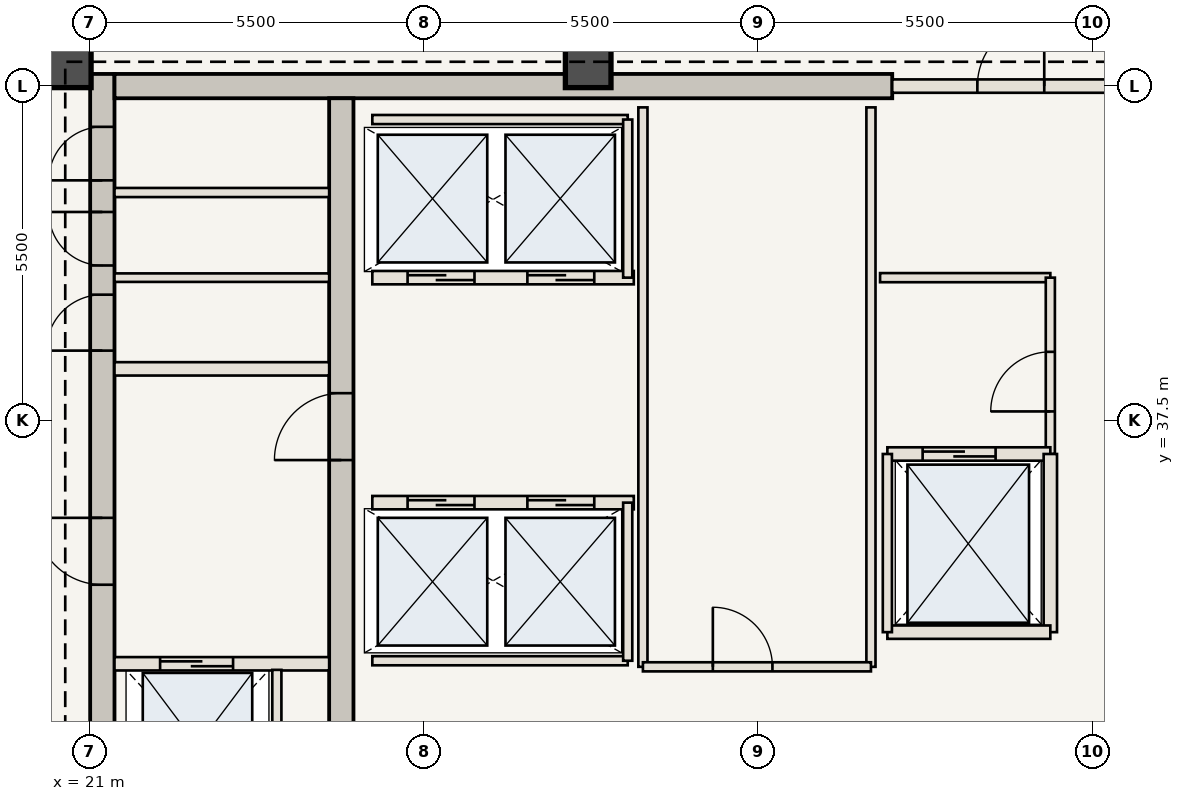
"""IFC4 building model, lengths in metres.
Left out: names, types, materials, properties, quantities, classifications, styles, units other than length and angle.
Written with IfcOpenShell. Run it as: python <this file> out.ifc"""

import sys

from ifc_helpers import new_model, si_unit, direction, frame, frame_2d, origin, origin_2d, place, context, subcontext, project, spatial, rectangle, extrude, element, fill, save


model = new_model("IFC4")
c1 = context("Model", 3, precision=1e-05, world=origin(), true_north=direction((0.0, 1.0)))
c2 = subcontext(c1, "Body", "Model", "MODEL_VIEW")
j1 = project(units=[si_unit("LENGTHUNIT", "METRE"), si_unit("PLANEANGLEUNIT", "RADIAN")], contexts=[c1])
p1 = place(None, origin())
s1 = spatial("IfcSite", under=j1, at=p1, CompositionType="ELEMENT")
p2 = place(p1, origin())
s2 = spatial("IfcBuilding", under=s1, at=p2, CompositionType="ELEMENT")
p3 = place(p2, frame((0.0, 0.0, 269.85)))
s3 = spatial("IfcBuildingStorey", under=s2, at=p3, CompositionType="ELEMENT", Elevation=269.85)
p4 = place(p3, frame((21.21, 30.6, 0.0), z_axis=(0.0, 0.0, 1.0), x_axis=(0.0, 1.0, 0.0)))
e1 = element("IfcWall", 1, at=p4, inside=s3, PredefinedType="SHEAR", context=c2, shape_type="SweptSolid", body=[
    extrude(rectangle(XDim=12.6, YDim=0.4, at=frame_2d((6.3, 0.0))), origin(), (0.0, 0.0, 1.0), 3.85),
])
p5 = place(p4, frame((4.2, 0.0, 0.0)))
e2 = element("IfcOpeningElement", 2, at=p5, cuts=e1, PredefinedType="OPENING", context=c2, shape_type="SweptSolid", body=[
    extrude(rectangle(XDim=1.1, YDim=2.15, at=frame_2d((0.55, 1.075))), frame((0.0, 0.21, 0.0), z_axis=(0.0, -1.0, 0.0), x_axis=(1.0, 0.0, 0.0)), (0.0, 0.0, 1.0), 0.42),
])
p6 = place(p4, frame((8.05, 0.0, 0.0)))
e3 = element("IfcOpeningElement", 3, at=p6, cuts=e1, PredefinedType="OPENING", context=c2, shape_type="SweptSolid", body=[
    extrude(rectangle(XDim=0.92, YDim=2.1, at=frame_2d((0.46, 1.05))), frame((0.0, 0.21, 0.0), z_axis=(0.0, -1.0, 0.0), x_axis=(1.0, 0.0, 0.0)), (0.0, 0.0, 1.0), 0.42),
])
p7 = place(p4, frame((9.45, 0.0, 0.0)))
e4 = element("IfcOpeningElement", 4, at=p7, cuts=e1, PredefinedType="OPENING", context=c2, shape_type="SweptSolid", body=[
    extrude(rectangle(XDim=0.88, YDim=2.1, at=frame_2d((0.44, 1.05))), frame((0.0, 0.21, 0.0), z_axis=(0.0, -1.0, 0.0), x_axis=(1.0, 0.0, 0.0)), (0.0, 0.0, 1.0), 0.42),
])
p8 = place(p4, frame((10.85, 0.0, 0.0)))
e5 = element("IfcOpeningElement", 5, at=p8, cuts=e1, PredefinedType="OPENING", context=c2, shape_type="SweptSolid", body=[
    extrude(rectangle(XDim=0.88, YDim=2.1, at=frame_2d((0.44, 1.05))), frame((0.0, 0.21, 0.0), z_axis=(0.0, -1.0, 0.0), x_axis=(1.0, 0.0, 0.0)), (0.0, 0.0, 1.0), 0.42),
])
p9 = place(p3, frame((21.41, 43.0, 0.0), z_axis=(0.0, 0.0, 1.0), x_axis=(1.0, 0.0, 0.0)))
e6 = element("IfcWall", 6, at=p9, inside=s3, PredefinedType="SHEAR", context=c2, shape_type="SweptSolid", body=[
    extrude(rectangle(XDim=12.79, YDim=0.4, at=frame_2d((6.395, 0.0))), origin(), (0.0, 0.0, 1.0), 3.85),
])
p10 = place(p3, frame((25.14, 30.6, 0.0), z_axis=(0.0, 0.0, 1.0), x_axis=(0.0, 1.0, 0.0)))
e7 = element("IfcWall", 7, at=p10, inside=s3, PredefinedType="SHEAR", context=c2, shape_type="SweptSolid", body=[
    extrude(rectangle(XDim=12.2, YDim=0.4, at=frame_2d((6.1, 0.0))), origin(), (0.0, 0.0, 1.0), 3.85),
])
p11 = place(p10, frame((6.25, 0.0, 0.0)))
e8 = element("IfcOpeningElement", 8, at=p11, cuts=e7, PredefinedType="OPENING", context=c2, shape_type="SweptSolid", body=[
    extrude(rectangle(XDim=1.1, YDim=2.15, at=frame_2d((0.55, 1.075))), frame((0.0, 0.21, 0.0), z_axis=(0.0, -1.0, 0.0), x_axis=(1.0, 0.0, 0.0)), (0.0, 0.0, 1.0), 0.42),
])
for number, where, z_axis, x_axis in (
    (9, (29.2, 43.35, 0.0), (0.0, 0.0, 1.0), (1.0, 0.0, 0.0)),
    (10, (20.65, 43.35, 0.0), (0.0, 0.0, 1.0), (1.0, 0.0, 0.0)),
):
    element("IfcColumn", number, at=place(p3, frame(where, z_axis=z_axis, x_axis=x_axis)), inside=s3, PredefinedType="COLUMN", context=c2, shape_type="SweptSolid", body=[
        extrude(rectangle(XDim=0.75, YDim=0.75, at=origin_2d()), origin(), (0.0, 0.0, 1.0), 3.85),
    ])
p12 = place(p3, frame((21.41, 33.5, 0.0), z_axis=(0.0, 0.0, 1.0), x_axis=(1.0, 0.0, 0.0)))
e11 = element("IfcWall", 11, at=p12, inside=s3, PredefinedType="STANDARD", context=c2, shape_type="SweptSolid", body=[
    extrude(rectangle(XDim=3.53, YDim=0.22, at=frame_2d((1.765, 0.0))), origin(), (0.0, 0.0, 1.0), 3.685),
])
p13 = place(p12, frame((0.75, 0.0, 0.0)))
e12 = element("IfcOpeningElement", 12, at=p13, cuts=e11, PredefinedType="OPENING", context=c2, shape_type="SweptSolid", body=[
    extrude(rectangle(XDim=1.2, YDim=2.2, at=frame_2d((0.6, 1.1))), frame((0.0, 0.12, 0.0), z_axis=(0.0, -1.0, 0.0), x_axis=(1.0, 0.0, 0.0)), (0.0, 0.0, 1.0), 0.24),
])
p14 = place(p3, frame((24.08, 30.75, 0.0), z_axis=(0.0, 0.0, 1.0), x_axis=(0.0, 1.0, 0.0)))
e13 = element("IfcWall", 13, at=p14, inside=s3, PredefinedType="STANDARD", context=c2, shape_type="SweptSolid", body=[
    extrude(rectangle(XDim=2.65, YDim=0.15, at=frame_2d((1.325, 0.0))), origin(), (0.0, 0.0, 1.0), 3.685),
])
p15 = place(p3, frame((21.41, 38.35, 0.0), z_axis=(0.0, 0.0, 1.0), x_axis=(1.0, 0.0, 0.0)))
e14 = element("IfcWall", 14, at=p15, inside=s3, PredefinedType="STANDARD", context=c2, shape_type="SweptSolid", body=[
    extrude(rectangle(XDim=3.53, YDim=0.22, at=frame_2d((1.765, 0.0))), origin(), (0.0, 0.0, 1.0), 3.685),
])
p16 = place(p3, frame((21.41, 39.85, 0.0), z_axis=(0.0, 0.0, 1.0), x_axis=(1.0, 0.0, 0.0)))
e15 = element("IfcWall", 15, at=p16, inside=s3, PredefinedType="STANDARD", context=c2, shape_type="SweptSolid", body=[
    extrude(rectangle(XDim=3.53, YDim=0.14, at=frame_2d((1.765, 0.0))), origin(), (0.0, 0.0, 1.0), 3.685),
])
p17 = place(p3, frame((21.41, 41.25, 0.0), z_axis=(0.0, 0.0, 1.0), x_axis=(1.0, 0.0, 0.0)))
e16 = element("IfcWall", 16, at=p17, inside=s3, PredefinedType="STANDARD", context=c2, shape_type="SweptSolid", body=[
    extrude(rectangle(XDim=3.53, YDim=0.15, at=frame_2d((1.765, 0.0))), origin(), (0.0, 0.0, 1.0), 3.685),
])
p18 = place(p3, frame((34.0, 39.85, 0.0), z_axis=(0.0, 0.0, 1.0), x_axis=(1.0, 0.0, 0.0)))
e17 = element("IfcWall", 17, at=p18, inside=s3, PredefinedType="STANDARD", context=c2, shape_type="SweptSolid", body=[
    extrude(rectangle(XDim=2.8, YDim=0.15, at=frame_2d((1.4, 0.0))), origin(), (0.0, 0.0, 1.0), 3.685),
])
p19 = place(p3, frame((36.8, 36.95, 0.0), z_axis=(0.0, 0.0, 1.0), x_axis=(0.0, 1.0, 0.0)))
e18 = element("IfcWall", 18, at=p19, inside=s3, PredefinedType="STANDARD", context=c2, shape_type="SweptSolid", body=[
    extrude(rectangle(XDim=2.9, YDim=0.15, at=frame_2d((1.45, 0.0))), origin(), (0.0, 0.0, 1.0), 3.685),
])
p20 = place(p19, frame((0.7, 0.0, 0.0)))
e19 = element("IfcOpeningElement", 19, at=p20, cuts=e18, PredefinedType="OPENING", context=c2, shape_type="SweptSolid", body=[
    extrude(rectangle(XDim=0.98, YDim=2.2, at=frame_2d((0.49, 1.1))), frame((0.0, 0.085, 0.0), z_axis=(0.0, -1.0, 0.0), x_axis=(1.0, 0.0, 0.0)), (0.0, 0.0, 1.0), 0.17),
])
p21 = place(p3, frame((25.65, 36.15, 0.0), z_axis=(0.0, 0.0, 1.0), x_axis=(1.0, 0.0, 0.0)))
e20 = element("IfcWall", 20, at=p21, inside=s3, PredefinedType="STANDARD", context=c2, shape_type="SweptSolid", body=[
    extrude(rectangle(XDim=4.3, YDim=0.22, at=frame_2d((2.15, 0.0))), origin(), (0.0, 0.0, 1.0), 3.685),
])
p22 = place(p21, frame((0.58, 0.0, 0.0)))
e21 = element("IfcOpeningElement", 21, at=p22, cuts=e20, PredefinedType="OPENING", context=c2, shape_type="SweptSolid", body=[
    extrude(rectangle(XDim=1.1, YDim=2.15, at=frame_2d((0.55, 1.075))), frame((0.0, 0.12, 0.0), z_axis=(0.0, -1.0, 0.0), x_axis=(1.0, 0.0, 0.0)), (0.0, 0.0, 1.0), 0.24),
])
p23 = place(p21, frame((2.55, 0.0, 0.0)))
e22 = element("IfcOpeningElement", 22, at=p23, cuts=e20, PredefinedType="OPENING", context=c2, shape_type="SweptSolid", body=[
    extrude(rectangle(XDim=1.1, YDim=2.15, at=frame_2d((0.55, 1.075))), frame((0.0, 0.12, 0.0), z_axis=(0.0, -1.0, 0.0), x_axis=(1.0, 0.0, 0.0)), (0.0, 0.0, 1.0), 0.24),
])
p24 = place(p3, frame((25.65, 33.55, 0.0), z_axis=(0.0, 0.0, 1.0), x_axis=(1.0, 0.0, 0.0)))
e23 = element("IfcWall", 23, at=p24, inside=s3, PredefinedType="STANDARD", context=c2, shape_type="SweptSolid", body=[
    extrude(rectangle(XDim=4.2, YDim=0.15, at=frame_2d((2.1, 0.0))), origin(), (0.0, 0.0, 1.0), 3.685),
])
p25 = place(p3, frame((29.85, 33.55, 0.0), z_axis=(0.0, 0.0, 1.0), x_axis=(0.0, 1.0, 0.0)))
e24 = element("IfcWall", 24, at=p25, inside=s3, PredefinedType="STANDARD", context=c2, shape_type="SweptSolid", body=[
    extrude(rectangle(XDim=2.6, YDim=0.15, at=frame_2d((1.3, 0.0))), origin(), (0.0, 0.0, 1.0), 3.685),
])
p26 = place(p3, frame((25.65, 39.85, 0.0), z_axis=(0.0, 0.0, 1.0), x_axis=(1.0, 0.0, 0.0)))
e25 = element("IfcWall", 25, at=p26, inside=s3, PredefinedType="STANDARD", context=c2, shape_type="SweptSolid", body=[
    extrude(rectangle(XDim=4.3, YDim=0.22, at=frame_2d((2.15, 0.0))), origin(), (0.0, 0.0, 1.0), 3.685),
])
p27 = place(p26, frame((0.58, 0.0, 0.0)))
e26 = element("IfcOpeningElement", 26, at=p27, cuts=e25, PredefinedType="OPENING", context=c2, shape_type="SweptSolid", body=[
    extrude(rectangle(XDim=1.1, YDim=2.15, at=frame_2d((0.55, 1.075))), frame((0.0, 0.12, 0.0), z_axis=(0.0, -1.0, 0.0), x_axis=(1.0, 0.0, 0.0)), (0.0, 0.0, 1.0), 0.24),
])
p28 = place(p26, frame((2.55, 0.0, 0.0)))
e27 = element("IfcOpeningElement", 27, at=p28, cuts=e25, PredefinedType="OPENING", context=c2, shape_type="SweptSolid", body=[
    extrude(rectangle(XDim=1.1, YDim=2.15, at=frame_2d((0.55, 1.075))), frame((0.0, 0.12, 0.0), z_axis=(0.0, -1.0, 0.0), x_axis=(1.0, 0.0, 0.0)), (0.0, 0.0, 1.0), 0.24),
])
p29 = place(p3, frame((25.65, 42.45, 0.0), z_axis=(0.0, 0.0, 1.0), x_axis=(1.0, 0.0, 0.0)))
e28 = element("IfcWall", 28, at=p29, inside=s3, PredefinedType="STANDARD", context=c2, shape_type="SweptSolid", body=[
    extrude(rectangle(XDim=4.2, YDim=0.15, at=frame_2d((2.1, 0.0))), origin(), (0.0, 0.0, 1.0), 3.685),
])
p30 = place(p3, frame((29.85, 39.85, 0.0), z_axis=(0.0, 0.0, 1.0), x_axis=(0.0, 1.0, 0.0)))
e29 = element("IfcWall", 29, at=p30, inside=s3, PredefinedType="STANDARD", context=c2, shape_type="SweptSolid", body=[
    extrude(rectangle(XDim=2.6, YDim=0.15, at=frame_2d((1.3, 0.0))), origin(), (0.0, 0.0, 1.0), 3.685),
])
for number, where, z_axis, x_axis in (
    (30, (30.1, 33.45, 0.0), (0.0, 0.0, 1.0), (0.0, 1.0, 0.0)),
    (31, (33.85, 33.45, 0.0), (0.0, 0.0, 1.0), (0.0, 1.0, 0.0)),
):
    element("IfcWall", number, at=place(p3, frame(where, z_axis=z_axis, x_axis=x_axis)), inside=s3, PredefinedType="STANDARD", context=c2, shape_type="SweptSolid", body=[
        extrude(rectangle(XDim=9.2, YDim=0.15, at=frame_2d((4.6, 0.0))), origin(), (0.0, 0.0, 1.0), 3.685),
    ])
p31 = place(p3, frame((30.1, 33.45, 0.0), z_axis=(0.0, 0.0, 1.0), x_axis=(1.0, 0.0, 0.0)))
e32 = element("IfcWall", 32, at=p31, inside=s3, PredefinedType="STANDARD", context=c2, shape_type="SweptSolid", body=[
    extrude(rectangle(XDim=3.75, YDim=0.15, at=frame_2d((1.875, 0.0))), origin(), (0.0, 0.0, 1.0), 3.685),
])
p32 = place(p31, frame((1.15, 0.0, 0.0)))
e33 = element("IfcOpeningElement", 33, at=p32, cuts=e32, PredefinedType="OPENING", context=c2, shape_type="SweptSolid", body=[
    extrude(rectangle(XDim=0.98, YDim=2.2, at=frame_2d((0.49, 1.1))), frame((0.0, 0.085, 0.0), z_axis=(0.0, -1.0, 0.0), x_axis=(1.0, 0.0, 0.0)), (0.0, 0.0, 1.0), 0.17),
])
p33 = place(p3, frame((34.2, 43.0, 0.0), z_axis=(0.0, 0.0, 1.0), x_axis=(1.0, 0.0, 0.0)))
e34 = element("IfcWall", 34, at=p33, inside=s3, PredefinedType="STANDARD", context=c2, shape_type="SweptSolid", body=[
    extrude(rectangle(XDim=3.55, YDim=0.22, at=frame_2d((1.775, 0.0))), origin(), (0.0, 0.0, 1.0), 3.685),
])
p34 = place(p33, frame((1.4, 0.0, 0.0)))
e35 = element("IfcOpeningElement", 35, at=p34, cuts=e34, PredefinedType="OPENING", context=c2, shape_type="SweptSolid", body=[
    extrude(rectangle(XDim=1.1, YDim=2.15, at=frame_2d((0.55, 1.075))), frame((0.0, 0.12, 0.0), z_axis=(0.0, -1.0, 0.0), x_axis=(1.0, 0.0, 0.0)), (0.0, 0.0, 1.0), 0.24),
])
p35 = place(p3, frame((34.12, 36.95, 0.0), z_axis=(0.0, 0.0, 1.0), x_axis=(1.0, 0.0, 0.0)))
e36 = element("IfcWall", 36, at=p35, inside=s3, PredefinedType="STANDARD", context=c2, shape_type="SweptSolid", body=[
    extrude(rectangle(XDim=2.68, YDim=0.22, at=frame_2d((1.34, 0.0))), origin(), (0.0, 0.0, 1.0), 3.685),
])
p36 = place(p35, frame((0.58, 0.0, 0.0)))
e37 = element("IfcOpeningElement", 37, at=p36, cuts=e36, PredefinedType="OPENING", context=c2, shape_type="SweptSolid", body=[
    extrude(rectangle(XDim=1.2, YDim=2.2, at=frame_2d((0.6, 1.1))), frame((0.0, 0.12, 0.0), z_axis=(0.0, -1.0, 0.0), x_axis=(1.0, 0.0, 0.0)), (0.0, 0.0, 1.0), 0.24),
])
p37 = place(p3, frame((36.8, 34.02, 0.0), z_axis=(0.0, 0.0, 1.0), x_axis=(0.0, 1.0, 0.0)))
e38 = element("IfcWall", 38, at=p37, inside=s3, PredefinedType="STANDARD", context=c2, shape_type="SweptSolid", body=[
    extrude(rectangle(XDim=2.93, YDim=0.22, at=frame_2d((1.465, 0.0))), origin(), (0.0, 0.0, 1.0), 3.685),
])
p38 = place(p3, frame((34.12, 34.02, 0.0), z_axis=(0.0, 0.0, 1.0), x_axis=(1.0, 0.0, 0.0)))
e39 = element("IfcWall", 39, at=p38, inside=s3, PredefinedType="STANDARD", context=c2, shape_type="SweptSolid", body=[
    extrude(rectangle(XDim=2.68, YDim=0.22, at=frame_2d((1.34, 0.0))), origin(), (0.0, 0.0, 1.0), 3.685),
])
p39 = place(p3, frame((34.12, 34.02, 0.0), z_axis=(0.0, 0.0, 1.0), x_axis=(0.0, 1.0, 0.0)))
e40 = element("IfcWall", 40, at=p39, inside=s3, PredefinedType="STANDARD", context=c2, shape_type="SweptSolid", body=[
    extrude(rectangle(XDim=2.93, YDim=0.15, at=frame_2d((1.465, 0.0))), origin(), (0.0, 0.0, 1.0), 3.685),
])
p40 = place(p5, origin())
e41 = element("IfcDoor", 41, at=p40, inside=s3, OperationType="SINGLE_SWING_RIGHT", PredefinedType="DOOR", context=c2, shape_type="SweptSolid", body=[
    extrude(rectangle(XDim=1.1, YDim=2.15, at=frame_2d((0.55, 1.075))), frame((0.0, 0.025, 0.0), z_axis=(0.0, -1.0, 0.0), x_axis=(1.0, 0.0, 0.0)), (0.0, 0.0, 1.0), 0.05),
])
fill(e2, e41)
p41 = place(p11, origin())
e42 = element("IfcDoor", 42, at=p41, inside=s3, OperationType="SINGLE_SWING_LEFT", PredefinedType="DOOR", context=c2, shape_type="SweptSolid", body=[
    extrude(rectangle(XDim=1.1, YDim=2.15, at=frame_2d((0.55, 1.075))), frame((0.0, 0.025, 0.0), z_axis=(0.0, -1.0, 0.0), x_axis=(1.0, 0.0, 0.0)), (0.0, 0.0, 1.0), 0.05),
])
fill(e8, e42)
p42 = place(p6, origin())
e43 = element("IfcDoor", 43, at=p42, inside=s3, OperationType="SINGLE_SWING_LEFT", PredefinedType="DOOR", context=c2, shape_type="SweptSolid", body=[
    extrude(rectangle(XDim=0.92, YDim=2.1, at=frame_2d((0.46, 1.05))), frame((0.0, 0.025, 0.0), z_axis=(0.0, -1.0, 0.0), x_axis=(1.0, 0.0, 0.0)), (0.0, 0.0, 1.0), 0.05),
])
fill(e3, e43)
p43 = place(p7, origin())
e44 = element("IfcDoor", 44, at=p43, inside=s3, OperationType="SINGLE_SWING_RIGHT", PredefinedType="DOOR", context=c2, shape_type="SweptSolid", body=[
    extrude(rectangle(XDim=0.88, YDim=2.1, at=frame_2d((0.44, 1.05))), frame((0.0, 0.025, 0.0), z_axis=(0.0, -1.0, 0.0), x_axis=(1.0, 0.0, 0.0)), (0.0, 0.0, 1.0), 0.05),
])
fill(e4, e44)
p44 = place(p8, origin())
e45 = element("IfcDoor", 45, at=p44, inside=s3, OperationType="SINGLE_SWING_LEFT", PredefinedType="DOOR", context=c2, shape_type="SweptSolid", body=[
    extrude(rectangle(XDim=0.88, YDim=2.1, at=frame_2d((0.44, 1.05))), frame((0.0, 0.025, 0.0), z_axis=(0.0, -1.0, 0.0), x_axis=(1.0, 0.0, 0.0)), (0.0, 0.0, 1.0), 0.05),
])
fill(e5, e45)
p45 = place(p13, origin())
e46 = element("IfcDoor", 46, at=p45, inside=s3, OperationType="DOUBLE_DOOR_SLIDING", PredefinedType="DOOR", context=c2, shape_type="SweptSolid", body=[
    extrude(rectangle(XDim=1.2, YDim=2.2, at=frame_2d((0.6, 1.1))), frame((0.0, 0.025, 0.0), z_axis=(0.0, -1.0, 0.0), x_axis=(1.0, 0.0, 0.0)), (0.0, 0.0, 1.0), 0.05),
])
fill(e12, e46)
p46 = place(p20, origin())
e47 = element("IfcDoor", 47, at=p46, inside=s3, OperationType="SINGLE_SWING_LEFT", PredefinedType="DOOR", context=c2, shape_type="SweptSolid", body=[
    extrude(rectangle(XDim=0.98, YDim=2.2, at=frame_2d((0.49, 1.1))), frame((0.0, 0.025, 0.0), z_axis=(0.0, -1.0, 0.0), x_axis=(1.0, 0.0, 0.0)), (0.0, 0.0, 1.0), 0.05),
])
fill(e19, e47)
p47 = place(p22, origin())
e48 = element("IfcDoor", 48, at=p47, inside=s3, OperationType="DOUBLE_DOOR_SLIDING", PredefinedType="DOOR", context=c2, shape_type="SweptSolid", body=[
    extrude(rectangle(XDim=1.1, YDim=2.15, at=frame_2d((0.55, 1.075))), frame((0.0, 0.025, 0.0), z_axis=(0.0, -1.0, 0.0), x_axis=(1.0, 0.0, 0.0)), (0.0, 0.0, 1.0), 0.05),
])
fill(e21, e48)
p48 = place(p23, origin())
e49 = element("IfcDoor", 49, at=p48, inside=s3, OperationType="DOUBLE_DOOR_SLIDING", PredefinedType="DOOR", context=c2, shape_type="SweptSolid", body=[
    extrude(rectangle(XDim=1.1, YDim=2.15, at=frame_2d((0.55, 1.075))), frame((0.0, 0.025, 0.0), z_axis=(0.0, -1.0, 0.0), x_axis=(1.0, 0.0, 0.0)), (0.0, 0.0, 1.0), 0.05),
])
fill(e22, e49)
p49 = place(p27, origin())
e50 = element("IfcDoor", 50, at=p49, inside=s3, OperationType="DOUBLE_DOOR_SLIDING", PredefinedType="DOOR", context=c2, shape_type="SweptSolid", body=[
    extrude(rectangle(XDim=1.1, YDim=2.15, at=frame_2d((0.55, 1.075))), frame((0.0, 0.025, 0.0), z_axis=(0.0, -1.0, 0.0), x_axis=(1.0, 0.0, 0.0)), (0.0, 0.0, 1.0), 0.05),
])
fill(e26, e50)
p50 = place(p28, origin())
e51 = element("IfcDoor", 51, at=p50, inside=s3, OperationType="DOUBLE_DOOR_SLIDING", PredefinedType="DOOR", context=c2, shape_type="SweptSolid", body=[
    extrude(rectangle(XDim=1.1, YDim=2.15, at=frame_2d((0.55, 1.075))), frame((0.0, 0.025, 0.0), z_axis=(0.0, -1.0, 0.0), x_axis=(1.0, 0.0, 0.0)), (0.0, 0.0, 1.0), 0.05),
])
fill(e27, e51)
p51 = place(p32, origin())
e52 = element("IfcDoor", 52, at=p51, inside=s3, OperationType="SINGLE_SWING_LEFT", PredefinedType="DOOR", context=c2, shape_type="SweptSolid", body=[
    extrude(rectangle(XDim=0.98, YDim=2.2, at=frame_2d((0.49, 1.1))), frame((0.0, 0.025, 0.0), z_axis=(0.0, -1.0, 0.0), x_axis=(1.0, 0.0, 0.0)), (0.0, 0.0, 1.0), 0.05),
])
fill(e33, e52)
p52 = place(p34, origin())
e53 = element("IfcDoor", 53, at=p52, inside=s3, OperationType="SINGLE_SWING_RIGHT", PredefinedType="DOOR", context=c2, shape_type="SweptSolid", body=[
    extrude(rectangle(XDim=1.1, YDim=2.15, at=frame_2d((0.55, 1.075))), frame((0.0, 0.025, 0.0), z_axis=(0.0, -1.0, 0.0), x_axis=(1.0, 0.0, 0.0)), (0.0, 0.0, 1.0), 0.05),
])
fill(e35, e53)
p53 = place(p36, origin())
e54 = element("IfcDoor", 54, at=p53, inside=s3, OperationType="DOUBLE_DOOR_SLIDING", PredefinedType="DOOR", context=c2, shape_type="SweptSolid", body=[
    extrude(rectangle(XDim=1.2, YDim=2.2, at=frame_2d((0.6, 1.1))), frame((0.0, 0.025, 0.0), z_axis=(0.0, -1.0, 0.0), x_axis=(1.0, 0.0, 0.0)), (0.0, 0.0, 1.0), 0.05),
])
fill(e37, e54)
save(model, sys.argv[1])
